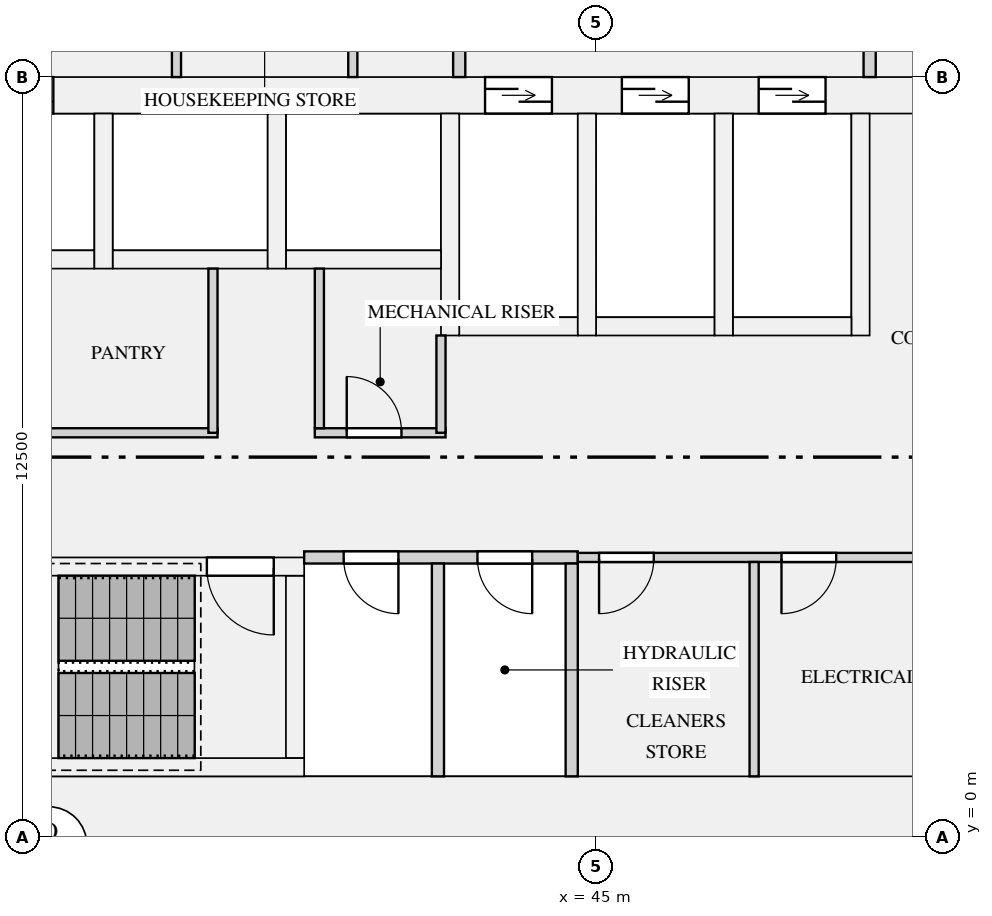
"""IFC4 building model, lengths in metres.
Left out: names, types, materials, properties, quantities, classifications, styles, units other than length and angle.
Written with IfcOpenShell. Run it as: python <this file> out.ifc"""

import sys

from ifc_helpers import new_model, si_unit, direction, frame, frame_2d, origin, place, context, subcontext, project, spatial, rectangle, extrude, element, fill, save


model = new_model("IFC4")
c1 = context("Model", 3, precision=1e-05, world=origin(), true_north=direction((0.0, 1.0)))
c2 = subcontext(c1, "Body", "Model", "MODEL_VIEW")
j1 = project(units=[si_unit("LENGTHUNIT", "METRE"), si_unit("PLANEANGLEUNIT", "RADIAN")], contexts=[c1])
p1 = place(None, origin())
s1 = spatial("IfcSite", under=j1, at=p1, CompositionType="ELEMENT")
p2 = place(p1, origin())
s2 = spatial("IfcBuilding", under=s1, at=p2, CompositionType="ELEMENT")
p3 = place(p2, frame((0.0, 0.0, 38.4)))
s3 = spatial("IfcBuildingStorey", under=s2, at=p3, CompositionType="ELEMENT", Elevation=38.4)
p4 = place(p3, frame((19.0, 0.5, 0.0), z_axis=(0.0, 0.0, 1.0), x_axis=(1.0, 0.0, 0.0)))
e1 = element("IfcWall", 1, at=p4, inside=s3, PredefinedType="SHEAR", context=c2, shape_type="SweptSolid", body=[
    extrude(rectangle(XDim=34.0, YDim=1.0, at=frame_2d((17.0, 0.0))), origin(), (0.0, 0.0, 1.0), 3.15),
])
p5 = place(p3, frame((19.0, 12.2, 0.0), z_axis=(0.0, 0.0, 1.0), x_axis=(1.0, 0.0, 0.0)))
e2 = element("IfcWall", 2, at=p5, inside=s3, PredefinedType="SHEAR", context=c2, shape_type="SweptSolid", body=[
    extrude(rectangle(XDim=34.0, YDim=0.6, at=frame_2d((17.0, 0.0))), origin(), (0.0, 0.0, 1.0), 3.15),
])
p6 = place(p5, frame((4.475, 0.0, 0.0)))
e3 = element("IfcOpeningElement", 3, at=p6, cuts=e2, PredefinedType="OPENING", context=c2, shape_type="SweptSolid", body=[
    extrude(rectangle(XDim=1.2, YDim=2.1, at=frame_2d((0.6, 1.05))), frame((0.0, 0.31, 0.0), z_axis=(0.0, -1.0, 0.0), x_axis=(1.0, 0.0, 0.0)), (0.0, 0.0, 1.0), 0.62),
])
p7 = place(p5, frame((7.325, 0.0, 0.0)))
e4 = element("IfcOpeningElement", 4, at=p7, cuts=e2, PredefinedType="OPENING", context=c2, shape_type="SweptSolid", body=[
    extrude(rectangle(XDim=1.2, YDim=2.1, at=frame_2d((0.6, 1.05))), frame((0.0, 0.31, 0.0), z_axis=(0.0, -1.0, 0.0), x_axis=(1.0, 0.0, 0.0)), (0.0, 0.0, 1.0), 0.62),
])
p8 = place(p5, frame((10.175, 0.0, 0.0)))
e5 = element("IfcOpeningElement", 5, at=p8, cuts=e2, PredefinedType="OPENING", context=c2, shape_type="SweptSolid", body=[
    extrude(rectangle(XDim=1.2, YDim=2.1, at=frame_2d((0.6, 1.05))), frame((0.0, 0.31, 0.0), z_axis=(0.0, -1.0, 0.0), x_axis=(1.0, 0.0, 0.0)), (0.0, 0.0, 1.0), 0.62),
])
p9 = place(p5, frame((13.025, 0.0, 0.0)))
e6 = element("IfcOpeningElement", 6, at=p9, cuts=e2, PredefinedType="OPENING", context=c2, shape_type="SweptSolid", body=[
    extrude(rectangle(XDim=1.2, YDim=2.1, at=frame_2d((0.6, 1.05))), frame((0.0, 0.31, 0.0), z_axis=(0.0, -1.0, 0.0), x_axis=(1.0, 0.0, 0.0)), (0.0, 0.0, 1.0), 0.62),
])
p10 = place(p5, frame((15.875, 0.0, 0.0)))
e7 = element("IfcOpeningElement", 7, at=p10, cuts=e2, PredefinedType="OPENING", context=c2, shape_type="SweptSolid", body=[
    extrude(rectangle(XDim=1.2, YDim=2.1, at=frame_2d((0.6, 1.05))), frame((0.0, 0.31, 0.0), z_axis=(0.0, -1.0, 0.0), x_axis=(1.0, 0.0, 0.0)), (0.0, 0.0, 1.0), 0.62),
])
p11 = place(p5, frame((24.175, 0.0, 0.0)))
e8 = element("IfcOpeningElement", 8, at=p11, cuts=e2, PredefinedType="OPENING", context=c2, shape_type="SweptSolid", body=[
    extrude(rectangle(XDim=1.1, YDim=2.1, at=frame_2d((0.55, 1.05))), frame((0.0, 0.31, 0.0), z_axis=(0.0, -1.0, 0.0), x_axis=(1.0, 0.0, 0.0)), (0.0, 0.0, 1.0), 0.62),
])
p12 = place(p5, frame((26.425, 0.0, 0.0)))
e9 = element("IfcOpeningElement", 9, at=p12, cuts=e2, PredefinedType="OPENING", context=c2, shape_type="SweptSolid", body=[
    extrude(rectangle(XDim=1.1, YDim=2.1, at=frame_2d((0.55, 1.05))), frame((0.0, 0.31, 0.0), z_axis=(0.0, -1.0, 0.0), x_axis=(1.0, 0.0, 0.0)), (0.0, 0.0, 1.0), 0.62),
])
p13 = place(p5, frame((28.675, 0.0, 0.0)))
e10 = element("IfcOpeningElement", 10, at=p13, cuts=e2, PredefinedType="OPENING", context=c2, shape_type="SweptSolid", body=[
    extrude(rectangle(XDim=1.1, YDim=2.1, at=frame_2d((0.55, 1.05))), frame((0.0, 0.31, 0.0), z_axis=(0.0, -1.0, 0.0), x_axis=(1.0, 0.0, 0.0)), (0.0, 0.0, 1.0), 0.62),
])
p14 = place(p5, frame((1.15, 0.0, 0.0)))
e11 = element("IfcOpeningElement", 11, at=p14, cuts=e2, PredefinedType="OPENING", context=c2, shape_type="SweptSolid", body=[
    extrude(rectangle(XDim=1.2, YDim=2.1, at=frame_2d((0.6, 1.05))), frame((0.0, 0.31, 0.0), z_axis=(0.0, -1.0, 0.0), x_axis=(1.0, 0.0, 0.0)), (0.0, 0.0, 1.0), 0.62),
])
p15 = place(p5, frame((31.65, 0.0, 0.0)))
e12 = element("IfcOpeningElement", 12, at=p15, cuts=e2, PredefinedType="OPENING", context=c2, shape_type="SweptSolid", body=[
    extrude(rectangle(XDim=1.2, YDim=2.1, at=frame_2d((0.6, 1.05))), frame((0.0, 0.31, 0.0), z_axis=(0.0, -1.0, 0.0), x_axis=(1.0, 0.0, 0.0)), (0.0, 0.0, 1.0), 0.62),
])
for number, where, z_axis, x_axis in (
    (13, (34.2, 9.5, 0.0), (0.0, 0.0, 1.0), (1.0, 0.0, 0.0)),
    (14, (37.05, 9.5, 0.0), (0.0, 0.0, 1.0), (1.0, 0.0, 0.0)),
):
    element("IfcWall", number, at=place(p3, frame(where, z_axis=z_axis, x_axis=x_axis)), inside=s3, PredefinedType="SHEAR", context=c2, shape_type="SweptSolid", body=[
        extrude(rectangle(XDim=2.55, YDim=0.3, at=frame_2d((1.275, 0.0))), origin(), (0.0, 0.0, 1.0), 3.15),
    ])
p16 = place(p3, frame((36.9, 9.35, 0.0), z_axis=(0.0, 0.0, 1.0), x_axis=(0.0, 1.0, 0.0)))
e15 = element("IfcWall", 15, at=p16, inside=s3, PredefinedType="SHEAR", context=c2, shape_type="SweptSolid", body=[
    extrude(rectangle(XDim=2.55, YDim=0.3, at=frame_2d((1.275, 0.0))), origin(), (0.0, 0.0, 1.0), 3.15),
])
p17 = place(p3, frame((39.9, 9.5, 0.0), z_axis=(0.0, 0.0, 1.0), x_axis=(1.0, 0.0, 0.0)))
e16 = element("IfcWall", 16, at=p17, inside=s3, PredefinedType="SHEAR", context=c2, shape_type="SweptSolid", body=[
    extrude(rectangle(XDim=2.55, YDim=0.3, at=frame_2d((1.275, 0.0))), origin(), (0.0, 0.0, 1.0), 3.15),
])
p18 = place(p3, frame((39.75, 9.35, 0.0), z_axis=(0.0, 0.0, 1.0), x_axis=(0.0, 1.0, 0.0)))
e17 = element("IfcWall", 17, at=p18, inside=s3, PredefinedType="SHEAR", context=c2, shape_type="SweptSolid", body=[
    extrude(rectangle(XDim=2.55, YDim=0.3, at=frame_2d((1.275, 0.0))), origin(), (0.0, 0.0, 1.0), 3.15),
])
p19 = place(p3, frame((42.75, 8.4, 0.0), z_axis=(0.0, 0.0, 1.0), x_axis=(1.0, 0.0, 0.0)))
e18 = element("IfcWall", 18, at=p19, inside=s3, PredefinedType="SHEAR", context=c2, shape_type="SweptSolid", body=[
    extrude(rectangle(XDim=1.95, YDim=0.3, at=frame_2d((0.975, 0.0))), origin(), (0.0, 0.0, 1.0), 3.15),
])
p20 = place(p3, frame((42.6, 8.25, 0.0), z_axis=(0.0, 0.0, 1.0), x_axis=(0.0, 1.0, 0.0)))
e19 = element("IfcWall", 19, at=p20, inside=s3, PredefinedType="SHEAR", context=c2, shape_type="SweptSolid", body=[
    extrude(rectangle(XDim=3.65, YDim=0.3, at=frame_2d((1.825, 0.0))), origin(), (0.0, 0.0, 1.0), 3.15),
])
p21 = place(p3, frame((45.0, 8.4, 0.0), z_axis=(0.0, 0.0, 1.0), x_axis=(1.0, 0.0, 0.0)))
e20 = element("IfcWall", 20, at=p21, inside=s3, PredefinedType="SHEAR", context=c2, shape_type="SweptSolid", body=[
    extrude(rectangle(XDim=1.95, YDim=0.3, at=frame_2d((0.975, 0.0))), origin(), (0.0, 0.0, 1.0), 3.15),
])
p22 = place(p3, frame((44.85, 8.25, 0.0), z_axis=(0.0, 0.0, 1.0), x_axis=(0.0, 1.0, 0.0)))
e21 = element("IfcWall", 21, at=p22, inside=s3, PredefinedType="SHEAR", context=c2, shape_type="SweptSolid", body=[
    extrude(rectangle(XDim=3.65, YDim=0.3, at=frame_2d((1.825, 0.0))), origin(), (0.0, 0.0, 1.0), 3.15),
])
p23 = place(p3, frame((47.25, 8.4, 0.0), z_axis=(0.0, 0.0, 1.0), x_axis=(1.0, 0.0, 0.0)))
e22 = element("IfcWall", 22, at=p23, inside=s3, PredefinedType="SHEAR", context=c2, shape_type="SweptSolid", body=[
    extrude(rectangle(XDim=1.95, YDim=0.3, at=frame_2d((0.975, 0.0))), origin(), (0.0, 0.0, 1.0), 3.15),
])
for number, where, z_axis, x_axis in (
    (23, (47.1, 8.25, 0.0), (0.0, 0.0, 1.0), (0.0, 1.0, 0.0)),
    (24, (49.35, 8.25, 0.0), (0.0, 0.0, 1.0), (0.0, 1.0, 0.0)),
):
    element("IfcWall", number, at=place(p3, frame(where, z_axis=z_axis, x_axis=x_axis)), inside=s3, PredefinedType="SHEAR", context=c2, shape_type="SweptSolid", body=[
        extrude(rectangle(XDim=3.65, YDim=0.3, at=frame_2d((1.825, 0.0))), origin(), (0.0, 0.0, 1.0), 3.15),
    ])
p24 = place(p3, frame((31.8, 1.15, 0.0), z_axis=(0.0, 0.0, 1.0), x_axis=(1.0, 0.0, 0.0)))
e25 = element("IfcWall", 25, at=p24, inside=s3, PredefinedType="SHEAR", context=c2, shape_type="SweptSolid", body=[
    extrude(rectangle(XDim=8.4, YDim=0.3, at=frame_2d((4.2, 0.0))), origin(), (0.0, 0.0, 1.0), 3.15),
])
p25 = place(p3, frame((31.8, 4.45, 0.0), z_axis=(0.0, 0.0, 1.0), x_axis=(1.0, 0.0, 0.0)))
e26 = element("IfcWall", 26, at=p25, inside=s3, PredefinedType="SHEAR", context=c2, shape_type="SweptSolid", body=[
    extrude(rectangle(XDim=8.4, YDim=0.3, at=frame_2d((4.2, 0.0))), origin(), (0.0, 0.0, 1.0), 3.15),
])
p26 = place(p25, frame((6.8, 0.0, 0.0)))
e27 = element("IfcOpeningElement", 27, at=p26, cuts=e26, PredefinedType="OPENING", context=c2, shape_type="SweptSolid", body=[
    extrude(rectangle(XDim=1.1, YDim=2.1, at=frame_2d((0.55, 1.05))), frame((0.0, 0.16, 0.0), z_axis=(0.0, -1.0, 0.0), x_axis=(1.0, 0.0, 0.0)), (0.0, 0.0, 1.0), 0.32),
])
p27 = place(p3, frame((40.05, 1.3, 0.0), z_axis=(0.0, 0.0, 1.0), x_axis=(0.0, 1.0, 0.0)))
e28 = element("IfcWall", 28, at=p27, inside=s3, PredefinedType="SHEAR", context=c2, shape_type="SweptSolid", body=[
    extrude(rectangle(XDim=3.0, YDim=0.3, at=frame_2d((1.5, 0.0))), origin(), (0.0, 0.0, 1.0), 3.15),
])
p28 = place(p3, frame((40.2, 4.6, 0.0), z_axis=(0.0, 0.0, 1.0), x_axis=(1.0, 0.0, 0.0)))
e29 = element("IfcWall", 29, at=p28, inside=s3, PredefinedType="PARTITIONING", context=c2, shape_type="SweptSolid", body=[
    extrude(rectangle(XDim=4.5, YDim=0.2, at=frame_2d((2.25, 0.0))), origin(), (0.0, 0.0, 1.0), 2.83),
])
p29 = place(p28, frame((0.65, 0.0, 0.0)))
e30 = element("IfcOpeningElement", 30, at=p29, cuts=e29, PredefinedType="OPENING", context=c2, shape_type="SweptSolid", body=[
    extrude(rectangle(XDim=0.9, YDim=2.1, at=frame_2d((0.45, 1.05))), frame((0.0, 0.11, 0.0), z_axis=(0.0, -1.0, 0.0), x_axis=(1.0, 0.0, 0.0)), (0.0, 0.0, 1.0), 0.22),
])
p30 = place(p28, frame((2.85, 0.0, 0.0)))
e31 = element("IfcOpeningElement", 31, at=p30, cuts=e29, PredefinedType="OPENING", context=c2, shape_type="SweptSolid", body=[
    extrude(rectangle(XDim=0.9, YDim=2.1, at=frame_2d((0.45, 1.05))), frame((0.0, 0.11, 0.0), z_axis=(0.0, -1.0, 0.0), x_axis=(1.0, 0.0, 0.0)), (0.0, 0.0, 1.0), 0.22),
])
p31 = place(p3, frame((44.7, 4.6, 0.0), z_axis=(0.0, 0.0, 1.0), x_axis=(1.0, 0.0, 0.0)))
e32 = element("IfcWall", 32, at=p31, inside=s3, PredefinedType="PARTITIONING", context=c2, shape_type="SweptSolid", body=[
    extrude(rectangle(XDim=8.3, YDim=0.15, at=frame_2d((4.15, 0.0))), origin(), (0.0, 0.0, 1.0), 2.83),
])
p32 = place(p31, frame((0.35, 0.0, 0.0)))
e33 = element("IfcOpeningElement", 33, at=p32, cuts=e32, PredefinedType="OPENING", context=c2, shape_type="SweptSolid", body=[
    extrude(rectangle(XDim=0.9, YDim=2.1, at=frame_2d((0.45, 1.05))), frame((0.0, 0.085, 0.0), z_axis=(0.0, -1.0, 0.0), x_axis=(1.0, 0.0, 0.0)), (0.0, 0.0, 1.0), 0.17),
])
p33 = place(p31, frame((3.35, 0.0, 0.0)))
e34 = element("IfcOpeningElement", 34, at=p33, cuts=e32, PredefinedType="OPENING", context=c2, shape_type="SweptSolid", body=[
    extrude(rectangle(XDim=0.9, YDim=2.1, at=frame_2d((0.45, 1.05))), frame((0.0, 0.085, 0.0), z_axis=(0.0, -1.0, 0.0), x_axis=(1.0, 0.0, 0.0)), (0.0, 0.0, 1.0), 0.17),
])
p34 = place(p3, frame((32.625, 6.65, 0.0), z_axis=(0.0, 0.0, 1.0), x_axis=(1.0, 0.0, 0.0)))
e35 = element("IfcWall", 35, at=p34, inside=s3, PredefinedType="PARTITIONING", context=c2, shape_type="SweptSolid", body=[
    extrude(rectangle(XDim=6.15, YDim=0.15, at=frame_2d((3.075, 0.0))), origin(), (0.0, 0.0, 1.0), 2.83),
])
p35 = place(p34, frame((0.525, 0.0, 0.0)))
e36 = element("IfcOpeningElement", 36, at=p35, cuts=e35, PredefinedType="OPENING", context=c2, shape_type="SweptSolid", body=[
    extrude(rectangle(XDim=0.9, YDim=2.1, at=frame_2d((0.45, 1.05))), frame((0.0, 0.085, 0.0), z_axis=(0.0, -1.0, 0.0), x_axis=(1.0, 0.0, 0.0)), (0.0, 0.0, 1.0), 0.17),
])
p36 = place(p3, frame((40.375, 6.65, 0.0), z_axis=(0.0, 0.0, 1.0), x_axis=(1.0, 0.0, 0.0)))
e37 = element("IfcWall", 37, at=p36, inside=s3, PredefinedType="PARTITIONING", context=c2, shape_type="SweptSolid", body=[
    extrude(rectangle(XDim=2.15, YDim=0.15, at=frame_2d((1.075, 0.0))), origin(), (0.0, 0.0, 1.0), 2.83),
])
p37 = place(p36, frame((0.525, 0.0, 0.0)))
e38 = element("IfcOpeningElement", 38, at=p37, cuts=e37, PredefinedType="OPENING", context=c2, shape_type="SweptSolid", body=[
    extrude(rectangle(XDim=0.9, YDim=2.1, at=frame_2d((0.45, 1.05))), frame((0.0, 0.085, 0.0), z_axis=(0.0, -1.0, 0.0), x_axis=(1.0, 0.0, 0.0)), (0.0, 0.0, 1.0), 0.17),
])
for number, where, z_axis, x_axis in (
    (39, (42.4, 1.0, 0.0), (0.0, 0.0, 1.0), (0.0, 1.0, 0.0)),
    (40, (44.6, 1.0, 0.0), (0.0, 0.0, 1.0), (0.0, 1.0, 0.0)),
):
    element("IfcWall", number, at=place(p3, frame(where, z_axis=z_axis, x_axis=x_axis)), inside=s3, PredefinedType="PARTITIONING", context=c2, shape_type="SweptSolid", body=[
        extrude(rectangle(XDim=3.5, YDim=0.2, at=frame_2d((1.75, 0.0))), origin(), (0.0, 0.0, 1.0), 2.83),
    ])
p38 = place(p3, frame((47.6, 1.0, 0.0), z_axis=(0.0, 0.0, 1.0), x_axis=(0.0, 1.0, 0.0)))
e41 = element("IfcWall", 41, at=p38, inside=s3, PredefinedType="PARTITIONING", context=c2, shape_type="SweptSolid", body=[
    extrude(rectangle(XDim=3.525, YDim=0.15, at=frame_2d((1.762, 0.0))), origin(), (0.0, 0.0, 1.0), 2.83),
])
p39 = place(p3, frame((38.7, 6.65, 0.0), z_axis=(0.0, 0.0, 1.0), x_axis=(0.0, 1.0, 0.0)))
e42 = element("IfcWall", 42, at=p39, inside=s3, PredefinedType="PARTITIONING", context=c2, shape_type="SweptSolid", body=[
    extrude(rectangle(XDim=2.7, YDim=0.15, at=frame_2d((1.35, 0.0))), origin(), (0.0, 0.0, 1.0), 2.83),
])
p40 = place(p3, frame((42.45, 6.65, 0.0), z_axis=(0.0, 0.0, 1.0), x_axis=(0.0, 1.0, 0.0)))
e43 = element("IfcWall", 43, at=p40, inside=s3, PredefinedType="PARTITIONING", context=c2, shape_type="SweptSolid", body=[
    extrude(rectangle(XDim=1.6, YDim=0.15, at=frame_2d((0.8, 0.0))), origin(), (0.0, 0.0, 1.0), 2.83),
])
p41 = place(p3, frame((40.45, 6.725, 0.0), z_axis=(0.0, 0.0, 1.0), x_axis=(0.0, 1.0, 0.0)))
e44 = element("IfcWall", 44, at=p41, inside=s3, PredefinedType="PARTITIONING", context=c2, shape_type="SweptSolid", body=[
    extrude(rectangle(XDim=2.625, YDim=0.15, at=frame_2d((1.312, 0.0))), origin(), (0.0, 0.0, 1.0), 2.83),
])
for number, where, z_axis, x_axis in (
    (45, (38.1, 12.5, 0.0), (0.0, 0.0, 1.0), (0.0, 1.0, 0.0)),
    (46, (41.0, 12.5, 0.0), (0.0, 0.0, 1.0), (0.0, 1.0, 0.0)),
):
    element("IfcWall", number, at=place(p3, frame(where, z_axis=z_axis, x_axis=x_axis)), inside=s3, PredefinedType="PARTITIONING", context=c2, shape_type="SweptSolid", body=[
        extrude(rectangle(XDim=1.925, YDim=0.15, at=frame_2d((0.962, 0.0))), origin(), (0.0, 0.0, 1.0), 2.83),
    ])
p42 = place(p3, frame((42.75, 12.5, 0.0), z_axis=(0.0, 0.0, 1.0), x_axis=(0.0, 1.0, 0.0)))
e47 = element("IfcWall", 47, at=p42, inside=s3, PredefinedType="PARTITIONING", context=c2, shape_type="SweptSolid", body=[
    extrude(rectangle(XDim=3.4, YDim=0.2, at=frame_2d((1.7, 0.0))), origin(), (0.0, 0.0, 1.0), 2.83),
])
p43 = place(p42, frame((2.2, 0.0, 0.0)))
e48 = element("IfcOpeningElement", 48, at=p43, cuts=e47, PredefinedType="OPENING", context=c2, shape_type="SweptSolid", body=[
    extrude(rectangle(XDim=1.0, YDim=2.1, at=frame_2d((0.5, 1.05))), frame((0.0, 0.11, 0.0), z_axis=(0.0, -1.0, 0.0), x_axis=(1.0, 0.0, 0.0)), (0.0, 0.0, 1.0), 0.22),
])
p44 = place(p3, frame((49.5, 12.5, 0.0), z_axis=(0.0, 0.0, 1.0), x_axis=(0.0, 1.0, 0.0)))
e49 = element("IfcWall", 49, at=p44, inside=s3, PredefinedType="PARTITIONING", context=c2, shape_type="SweptSolid", body=[
    extrude(rectangle(XDim=3.4, YDim=0.2, at=frame_2d((1.7, 0.0))), origin(), (0.0, 0.0, 1.0), 2.83),
])
p45 = place(p44, frame((1.15, 0.0, 0.0)))
e50 = element("IfcOpeningElement", 50, at=p45, cuts=e49, PredefinedType="OPENING", context=c2, shape_type="SweptSolid", body=[
    extrude(rectangle(XDim=1.1, YDim=2.1, at=frame_2d((0.55, 1.05))), frame((0.0, 0.11, 0.0), z_axis=(0.0, -1.0, 0.0), x_axis=(1.0, 0.0, 0.0)), (0.0, 0.0, 1.0), 0.22),
])
p46 = place(p10, origin())
e51 = element("IfcDoor", 51, at=p46, inside=s3, OperationType="DOUBLE_DOOR_SLIDING", PredefinedType="DOOR", context=c2, shape_type="SweptSolid", body=[
    extrude(rectangle(XDim=1.2, YDim=2.1, at=frame_2d((0.6, 1.05))), frame((0.0, 0.025, 0.0), z_axis=(0.0, -1.0, 0.0), x_axis=(1.0, 0.0, 0.0)), (0.0, 0.0, 1.0), 0.05),
])
fill(e7, e51)
p47 = place(p11, origin())
e52 = element("IfcDoor", 52, at=p47, inside=s3, OperationType="DOUBLE_DOOR_SLIDING", PredefinedType="DOOR", context=c2, shape_type="SweptSolid", body=[
    extrude(rectangle(XDim=1.1, YDim=2.1, at=frame_2d((0.55, 1.05))), frame((0.0, 0.025, 0.0), z_axis=(0.0, -1.0, 0.0), x_axis=(1.0, 0.0, 0.0)), (0.0, 0.0, 1.0), 0.05),
])
fill(e8, e52)
p48 = place(p12, origin())
e53 = element("IfcDoor", 53, at=p48, inside=s3, OperationType="DOUBLE_DOOR_SLIDING", PredefinedType="DOOR", context=c2, shape_type="SweptSolid", body=[
    extrude(rectangle(XDim=1.1, YDim=2.1, at=frame_2d((0.55, 1.05))), frame((0.0, 0.025, 0.0), z_axis=(0.0, -1.0, 0.0), x_axis=(1.0, 0.0, 0.0)), (0.0, 0.0, 1.0), 0.05),
])
fill(e9, e53)
p49 = place(p13, origin())
e54 = element("IfcDoor", 54, at=p49, inside=s3, OperationType="DOUBLE_DOOR_SLIDING", PredefinedType="DOOR", context=c2, shape_type="SweptSolid", body=[
    extrude(rectangle(XDim=1.1, YDim=2.1, at=frame_2d((0.55, 1.05))), frame((0.0, 0.025, 0.0), z_axis=(0.0, -1.0, 0.0), x_axis=(1.0, 0.0, 0.0)), (0.0, 0.0, 1.0), 0.05),
])
fill(e10, e54)
p50 = place(p26, frame((1.1, 0.0, 0.0), z_axis=(0.0, 0.0, 1.0), x_axis=(-1.0, 0.0, 0.0)))
e55 = element("IfcDoor", 55, at=p50, inside=s3, OperationType="SINGLE_SWING_LEFT", PredefinedType="DOOR", context=c2, shape_type="SweptSolid", body=[
    extrude(rectangle(XDim=1.1, YDim=2.1, at=frame_2d((0.55, 1.05))), frame((0.0, 0.025, 0.0), z_axis=(0.0, -1.0, 0.0), x_axis=(1.0, 0.0, 0.0)), (0.0, 0.0, 1.0), 0.05),
])
fill(e27, e55)
p51 = place(p37, origin())
e56 = element("IfcDoor", 56, at=p51, inside=s3, OperationType="SINGLE_SWING_LEFT", PredefinedType="DOOR", context=c2, shape_type="SweptSolid", body=[
    extrude(rectangle(XDim=0.9, YDim=2.1, at=frame_2d((0.45, 1.05))), frame((0.0, 0.025, 0.0), z_axis=(0.0, -1.0, 0.0), x_axis=(1.0, 0.0, 0.0)), (0.0, 0.0, 1.0), 0.05),
])
fill(e38, e56)
p52 = place(p32, frame((0.9, 0.0, 0.0), z_axis=(0.0, 0.0, 1.0), x_axis=(-1.0, 0.0, 0.0)))
e57 = element("IfcDoor", 57, at=p52, inside=s3, OperationType="SINGLE_SWING_RIGHT", PredefinedType="DOOR", context=c2, shape_type="SweptSolid", body=[
    extrude(rectangle(XDim=0.9, YDim=2.1, at=frame_2d((0.45, 1.05))), frame((0.0, 0.025, 0.0), z_axis=(0.0, -1.0, 0.0), x_axis=(1.0, 0.0, 0.0)), (0.0, 0.0, 1.0), 0.05),
])
fill(e33, e57)
p53 = place(p33, frame((0.9, 0.0, 0.0), z_axis=(0.0, 0.0, 1.0), x_axis=(-1.0, 0.0, 0.0)))
e58 = element("IfcDoor", 58, at=p53, inside=s3, OperationType="SINGLE_SWING_RIGHT", PredefinedType="DOOR", context=c2, shape_type="SweptSolid", body=[
    extrude(rectangle(XDim=0.9, YDim=2.1, at=frame_2d((0.45, 1.05))), frame((0.0, 0.025, 0.0), z_axis=(0.0, -1.0, 0.0), x_axis=(1.0, 0.0, 0.0)), (0.0, 0.0, 1.0), 0.05),
])
fill(e34, e58)
p54 = place(p29, frame((0.9, 0.0, 0.0), z_axis=(0.0, 0.0, 1.0), x_axis=(-1.0, 0.0, 0.0)))
e59 = element("IfcDoor", 59, at=p54, inside=s3, OperationType="SINGLE_SWING_LEFT", PredefinedType="DOOR", context=c2, shape_type="SweptSolid", body=[
    extrude(rectangle(XDim=0.9, YDim=2.1, at=frame_2d((0.45, 1.05))), frame((0.0, 0.025, 0.0), z_axis=(0.0, -1.0, 0.0), x_axis=(1.0, 0.0, 0.0)), (0.0, 0.0, 1.0), 0.05),
])
fill(e30, e59)
p55 = place(p30, frame((0.9, 0.0, 0.0), z_axis=(0.0, 0.0, 1.0), x_axis=(-1.0, 0.0, 0.0)))
e60 = element("IfcDoor", 60, at=p55, inside=s3, OperationType="SINGLE_SWING_LEFT", PredefinedType="DOOR", context=c2, shape_type="SweptSolid", body=[
    extrude(rectangle(XDim=0.9, YDim=2.1, at=frame_2d((0.45, 1.05))), frame((0.0, 0.025, 0.0), z_axis=(0.0, -1.0, 0.0), x_axis=(1.0, 0.0, 0.0)), (0.0, 0.0, 1.0), 0.05),
])
fill(e31, e60)
save(model, sys.argv[1])
